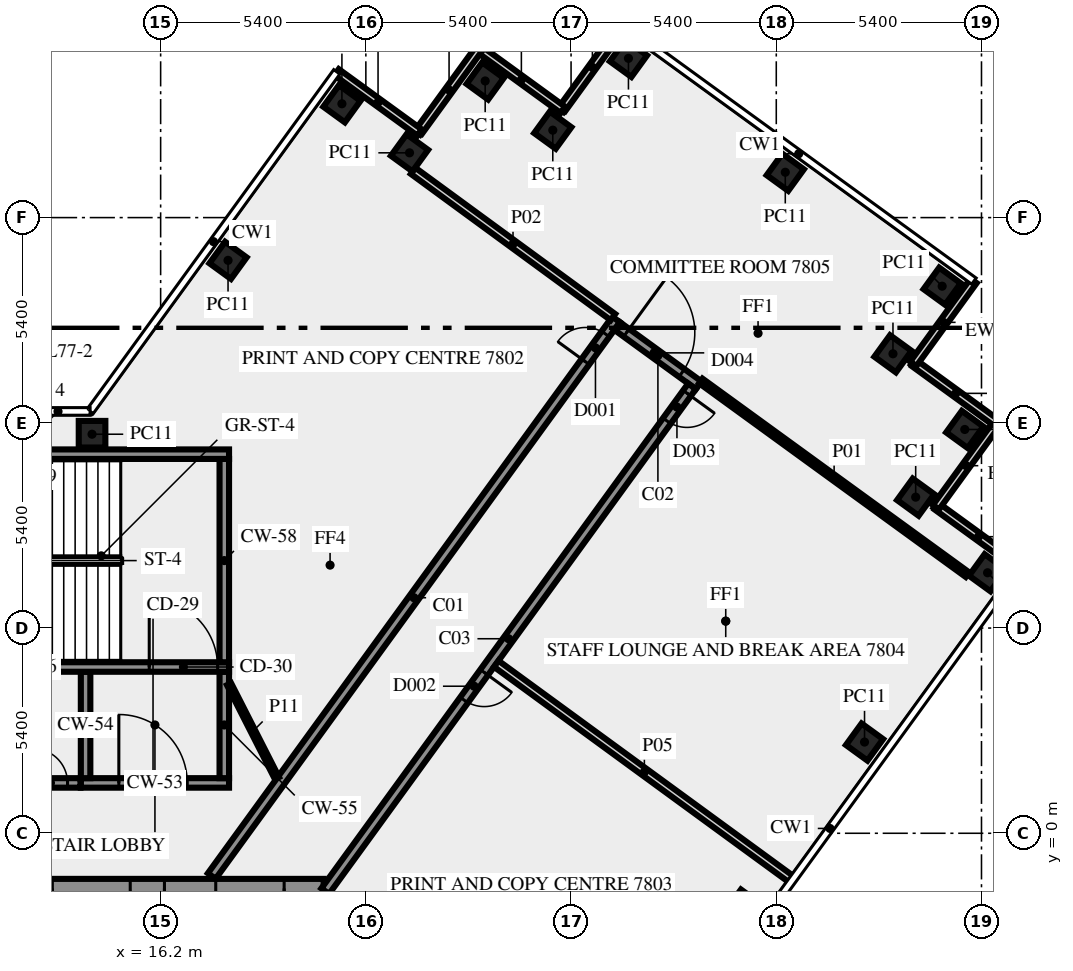
"""IFC4 building model, lengths in metres.
Left out: names, types, materials, properties, quantities, classifications, styles, units other than length and angle.
Written with IfcOpenShell. Run it as: python <this file> out.ifc"""

import sys

from ifc_helpers import new_model, si_unit, direction, frame, frame_2d, origin, origin_2d, place, context, subcontext, project, spatial, rectangle, extrude, element, fill, save


model = new_model("IFC4")
c1 = context("Model", 3, precision=1e-05, world=origin(), true_north=direction((0.0, 1.0)))
c2 = subcontext(c1, "Body", "Model", "MODEL_VIEW")
j1 = project(units=[si_unit("LENGTHUNIT", "METRE"), si_unit("PLANEANGLEUNIT", "RADIAN")], contexts=[c1])
p1 = place(None, origin())
s1 = spatial("IfcSite", under=j1, at=p1, CompositionType="ELEMENT")
p2 = place(p1, origin())
s2 = spatial("IfcBuilding", under=s1, at=p2, CompositionType="ELEMENT")
p3 = place(p2, frame((0.0, 0.0, 335.0)))
s3 = spatial("IfcBuildingStorey", under=s2, at=p3, CompositionType="ELEMENT", Elevation=335.0)
for number, where, z_axis, x_axis in (
    (1, (31.548, -1.969, 0.0), (0.0, 0.0, 1.0), (0.588, 0.809, 0.0)),
    (2, (34.722, 2.4, 0.0), (0.0, 0.0, 1.0), (0.588, 0.809, 0.0)),
    (3, (37.96, 6.855, 0.0), (0.0, 0.0, 1.0), (0.588, 0.809, 0.0)),
    (4, (36.068, 8.844, 0.0), (0.0, 0.0, 1.0), (0.588, 0.809, 0.0)),
    (5, (37.36, 10.625, 0.0), (0.0, 0.0, 1.0), (0.588, 0.809, 0.0)),
    (6, (35.471, 12.616, 0.0), (0.0, 0.0, 1.0), (-0.809, 0.588, 0.0)),
    (7, (36.765, 14.395, 0.0), (0.0, 0.0, 1.0), (-0.809, 0.588, 0.0)),
    (8, (32.637, 17.393, 0.0), (0.0, 0.0, 1.0), (-0.809, 0.588, 0.0)),
    (9, (28.51, 20.39, 0.0), (0.0, 0.0, 1.0), (-0.588, -0.809, 0.0)),
    (10, (26.519, 18.5, 0.0), (0.0, 0.0, 1.0), (-0.809, 0.588, 0.0)),
    (11, (24.74, 19.795, 0.0), (0.0, 0.0, 1.0), (-0.588, -0.809, 0.0)),
    (12, (22.749, 17.904, 0.0), (0.0, 0.0, 1.0), (-0.588, -0.809, 0.0)),
    (13, (20.97, 19.195, 0.0), (0.0, 0.0, 1.0), (-0.588, -0.809, 0.0)),
    (14, (17.974, 15.075, 0.0), (0.0, 0.0, 1.0), (-0.588, -0.809, 0.0)),
    (15, (14.395, 10.5, 0.0), (0.0, 0.0, 1.0), (-1.0, 0.0, 0.0)),
):
    element("IfcColumn", number, at=place(p3, frame(where, z_axis=z_axis, x_axis=x_axis)), inside=s3, PredefinedType="COLUMN", context=c2, shape_type="SweptSolid", body=[
        extrude(rectangle(XDim=0.7, YDim=0.7, at=origin_2d()), origin(), (0.0, 0.0, 1.0), 3.65),
    ])
for number, where, z_axis, x_axis in (
    (16, (38.814, 7.01, 0.0), (0.0, 0.0, 1.0), (-0.809, 0.588, 0.0)),
    (17, (36.602, 8.58, 0.0), (0.0, 0.0, 1.0), (0.588, 0.809, 0.0)),
    (18, (38.216, 10.782, 0.0), (0.0, 0.0, 1.0), (-0.809, 0.588, 0.0)),
    (19, (36.005, 12.352, 0.0), (0.0, 0.0, 1.0), (0.588, 0.809, 0.0)),
):
    element("IfcWall", number, at=place(p3, frame(where, z_axis=z_axis, x_axis=x_axis)), inside=s3, PredefinedType="SOLIDWALL", context=c2, shape_type="SweptSolid", body=[
        extrude(rectangle(XDim=2.7, YDim=0.2, at=frame_2d((1.35, 0.0))), origin(), (0.0, 0.0, 1.0), 3.65),
    ])
for number, where, z_axis, x_axis in (
    (20, (28.354, 21.247, 0.0), (0.0, 0.0, 1.0), (-0.588, -0.809, 0.0)),
    (21, (26.785, 19.036, 0.0), (0.0, 0.0, 1.0), (-0.809, 0.588, 0.0)),
):
    element("IfcWall", number, at=place(p3, frame(where, z_axis=z_axis, x_axis=x_axis)), inside=s3, PredefinedType="SOLIDWALL", context=c2, shape_type="SweptSolid", body=[
        extrude(rectangle(XDim=2.7, YDim=0.2, at=frame_2d((1.35, 0.0))), origin(), (0.0, 0.0, 1.0), 3.65),
    ])
for number, where, z_axis, x_axis in (
    (22, (24.583, 20.65, 0.0), (0.0, 0.0, 1.0), (-0.588, -0.809, 0.0)),
    (23, (23.013, 18.438, 0.0), (0.0, 0.0, 1.0), (-0.809, 0.588, 0.0)),
):
    element("IfcWall", number, at=place(p3, frame(where, z_axis=z_axis, x_axis=x_axis)), inside=s3, PredefinedType="SOLIDWALL", context=c2, shape_type="SweptSolid", body=[
        extrude(rectangle(XDim=2.7, YDim=0.2, at=frame_2d((1.35, 0.0))), origin(), (0.0, 0.0, 1.0), 3.65),
    ])
p4 = place(p3, frame((20.49, -1.45, 0.0), z_axis=(0.0, 0.0, 1.0), x_axis=(-1.0, 0.0, 0.0)))
e24 = element("IfcWall", 24, at=p4, inside=s3, PredefinedType="SHEAR", context=c2, shape_type="SweptSolid", body=[
    extrude(rectangle(XDim=40.98, YDim=0.5, at=frame_2d((20.49, 0.0))), origin(), (0.0, 0.0, 1.0), 3.65),
])
p5 = place(p4, frame((38.14, 0.0, 0.0)))
e25 = element("IfcOpeningElement", 25, at=p5, cuts=e24, PredefinedType="OPENING", context=c2, shape_type="SweptSolid", body=[
    extrude(rectangle(XDim=1.8, YDim=2.1, at=frame_2d((0.9, 1.05))), frame((0.0, 0.26, 0.0), z_axis=(0.0, -1.0, 0.0), x_axis=(1.0, 0.0, 0.0)), (0.0, 0.0, 1.0), 0.52),
])
p6 = place(p4, frame((36.728, 0.0, 0.0)))
e26 = element("IfcOpeningElement", 26, at=p6, cuts=e24, PredefinedType="OPENING", context=c2, shape_type="SweptSolid", body=[
    extrude(rectangle(XDim=0.8, YDim=2.1, at=frame_2d((0.4, 1.05))), frame((0.0, 0.26, 0.0), z_axis=(0.0, -1.0, 0.0), x_axis=(1.0, 0.0, 0.0)), (0.0, 0.0, 1.0), 0.52),
])
p7 = place(p4, frame((35.153, 0.0, 0.0)))
e27 = element("IfcOpeningElement", 27, at=p7, cuts=e24, PredefinedType="OPENING", context=c2, shape_type="SweptSolid", body=[
    extrude(rectangle(XDim=0.8, YDim=2.1, at=frame_2d((0.4, 1.05))), frame((0.0, 0.26, 0.0), z_axis=(0.0, -1.0, 0.0), x_axis=(1.0, 0.0, 0.0)), (0.0, 0.0, 1.0), 0.52),
])
p8 = place(p4, frame((32.94, 0.0, 0.0)))
e28 = element("IfcOpeningElement", 28, at=p8, cuts=e24, PredefinedType="OPENING", context=c2, shape_type="SweptSolid", body=[
    extrude(rectangle(XDim=0.9, YDim=2.1, at=frame_2d((0.45, 1.05))), frame((0.0, 0.26, 0.0), z_axis=(0.0, -1.0, 0.0), x_axis=(1.0, 0.0, 0.0)), (0.0, 0.0, 1.0), 0.52),
])
p9 = place(p4, frame((31.015, 0.0, 0.0)))
e29 = element("IfcOpeningElement", 29, at=p9, cuts=e24, PredefinedType="OPENING", context=c2, shape_type="SweptSolid", body=[
    extrude(rectangle(XDim=0.8, YDim=2.1, at=frame_2d((0.4, 1.05))), frame((0.0, 0.26, 0.0), z_axis=(0.0, -1.0, 0.0), x_axis=(1.0, 0.0, 0.0)), (0.0, 0.0, 1.0), 0.52),
])
p10 = place(p4, frame((24.765, 0.0, 0.0)))
e30 = element("IfcOpeningElement", 30, at=p10, cuts=e24, PredefinedType="OPENING", context=c2, shape_type="SweptSolid", body=[
    extrude(rectangle(XDim=0.8, YDim=2.1, at=frame_2d((0.4, 1.05))), frame((0.0, 0.26, 0.0), z_axis=(0.0, -1.0, 0.0), x_axis=(1.0, 0.0, 0.0)), (0.0, 0.0, 1.0), 0.52),
])
p11 = place(p4, frame((19.59, 0.0, 0.0)))
e31 = element("IfcOpeningElement", 31, at=p11, cuts=e24, PredefinedType="OPENING", context=c2, shape_type="SweptSolid", body=[
    extrude(rectangle(XDim=2.0, YDim=2.1, at=frame_2d((1.0, 1.05))), frame((0.0, 0.26, 0.0), z_axis=(0.0, -1.0, 0.0), x_axis=(1.0, 0.0, 0.0)), (0.0, 0.0, 1.0), 0.52),
])
p12 = place(p4, frame((15.103, 0.0, 0.0)))
e32 = element("IfcOpeningElement", 32, at=p12, cuts=e24, PredefinedType="OPENING", context=c2, shape_type="SweptSolid", body=[
    extrude(rectangle(XDim=0.9, YDim=2.1, at=frame_2d((0.45, 1.05))), frame((0.0, 0.26, 0.0), z_axis=(0.0, -1.0, 0.0), x_axis=(1.0, 0.0, 0.0)), (0.0, 0.0, 1.0), 0.52),
])
p13 = place(p4, frame((13.04, 0.0, 0.0)))
e33 = element("IfcOpeningElement", 33, at=p13, cuts=e24, PredefinedType="OPENING", context=c2, shape_type="SweptSolid", body=[
    extrude(rectangle(XDim=0.9, YDim=2.1, at=frame_2d((0.45, 1.05))), frame((0.0, 0.26, 0.0), z_axis=(0.0, -1.0, 0.0), x_axis=(1.0, 0.0, 0.0)), (0.0, 0.0, 1.0), 0.52),
])
p14 = place(p4, frame((10.177, 0.0, 0.0)))
e34 = element("IfcOpeningElement", 34, at=p14, cuts=e24, PredefinedType="OPENING", context=c2, shape_type="SweptSolid", body=[
    extrude(rectangle(XDim=0.9, YDim=2.1, at=frame_2d((0.45, 1.05))), frame((0.0, 0.26, 0.0), z_axis=(0.0, -1.0, 0.0), x_axis=(1.0, 0.0, 0.0)), (0.0, 0.0, 1.0), 0.52),
])
p15 = place(p4, frame((7.14, 0.0, 0.0)))
e35 = element("IfcOpeningElement", 35, at=p15, cuts=e24, PredefinedType="OPENING", context=c2, shape_type="SweptSolid", body=[
    extrude(rectangle(XDim=0.9, YDim=2.1, at=frame_2d((0.45, 1.05))), frame((0.0, 0.26, 0.0), z_axis=(0.0, -1.0, 0.0), x_axis=(1.0, 0.0, 0.0)), (0.0, 0.0, 1.0), 0.52),
])
p16 = place(p4, frame((4.19, 0.0, 0.0)))
e36 = element("IfcOpeningElement", 36, at=p16, cuts=e24, PredefinedType="OPENING", context=c2, shape_type="SweptSolid", body=[
    extrude(rectangle(XDim=0.9, YDim=2.1, at=frame_2d((0.45, 1.05))), frame((0.0, 0.26, 0.0), z_axis=(0.0, -1.0, 0.0), x_axis=(1.0, 0.0, 0.0)), (0.0, 0.0, 1.0), 0.52),
])
p17 = place(p4, frame((1.04, 0.0, 0.0)))
e37 = element("IfcOpeningElement", 37, at=p17, cuts=e24, PredefinedType="OPENING", context=c2, shape_type="SweptSolid", body=[
    extrude(rectangle(XDim=1.8, YDim=2.1, at=frame_2d((0.9, 1.05))), frame((0.0, 0.26, 0.0), z_axis=(0.0, -1.0, 0.0), x_axis=(1.0, 0.0, 0.0)), (0.0, 0.0, 1.0), 0.52),
])
p18 = place(p3, frame((14.1, 1.325, 0.0), z_axis=(0.0, 0.0, 1.0), x_axis=(1.0, 0.0, 0.0)))
e38 = element("IfcWall", 38, at=p18, inside=s3, PredefinedType="SHEAR", context=c2, shape_type="SweptSolid", body=[
    extrude(rectangle(XDim=3.9, YDim=0.25, at=frame_2d((1.95, 0.0))), origin(), (0.0, 0.0, 1.0), 3.65),
])
p19 = place(p18, frame((1.0, 0.0, 0.0)))
e39 = element("IfcOpeningElement", 39, at=p19, cuts=e38, PredefinedType="OPENING", context=c2, shape_type="SweptSolid", body=[
    extrude(rectangle(XDim=1.8, YDim=2.1, at=frame_2d((0.9, 1.05))), frame((0.0, 0.135, 0.0), z_axis=(0.0, -1.0, 0.0), x_axis=(1.0, 0.0, 0.0)), (0.0, 0.0, 1.0), 0.27),
])
for number, where, z_axis, x_axis in (
    (40, (14.225, 1.45, 0.0), (0.0, 0.0, 1.0), (0.0, 1.0, 0.0)),
    (41, (17.875, 1.45, 0.0), (0.0, 0.0, 1.0), (0.0, 1.0, 0.0)),
):
    element("IfcWall", number, at=place(p3, frame(where, z_axis=z_axis, x_axis=x_axis)), inside=s3, PredefinedType="SHEAR", context=c2, shape_type="SweptSolid", body=[
        extrude(rectangle(XDim=2.8, YDim=0.25, at=frame_2d((1.4, 0.0))), origin(), (0.0, 0.0, 1.0), 3.65),
    ])
p20 = place(p3, frame((7.5, 4.375, 0.0), z_axis=(0.0, 0.0, 1.0), x_axis=(1.0, 0.0, 0.0)))
e42 = element("IfcWall", 42, at=p20, inside=s3, PredefinedType="SHEAR", context=c2, shape_type="SweptSolid", body=[
    extrude(rectangle(XDim=10.5, YDim=0.25, at=frame_2d((5.25, 0.0))), origin(), (0.0, 0.0, 1.0), 3.65),
])
p21 = place(p20, frame((8.4, 0.0, 0.0)))
e43 = element("IfcOpeningElement", 43, at=p21, cuts=e42, PredefinedType="OPENING", context=c2, shape_type="SweptSolid", body=[
    extrude(rectangle(XDim=1.8, YDim=2.1, at=frame_2d((0.9, 1.05))), frame((0.0, 0.135, 0.0), z_axis=(0.0, -1.0, 0.0), x_axis=(1.0, 0.0, 0.0)), (0.0, 0.0, 1.0), 0.27),
])
p22 = place(p3, frame((17.875, 4.5, 0.0), z_axis=(0.0, 0.0, 1.0), x_axis=(0.0, 1.0, 0.0)))
e44 = element("IfcWall", 44, at=p22, inside=s3, PredefinedType="SHEAR", context=c2, shape_type="SweptSolid", body=[
    extrude(rectangle(XDim=5.35, YDim=0.25, at=frame_2d((2.675, 0.0))), origin(), (0.0, 0.0, 1.0), 3.65),
])
p23 = place(p3, frame((7.5, 9.975, 0.0), z_axis=(0.0, 0.0, 1.0), x_axis=(1.0, 0.0, 0.0)))
e45 = element("IfcWall", 45, at=p23, inside=s3, PredefinedType="SHEAR", context=c2, shape_type="SweptSolid", body=[
    extrude(rectangle(XDim=10.5, YDim=0.25, at=frame_2d((5.25, 0.0))), origin(), (0.0, 0.0, 1.0), 3.65),
])
p24 = place(p23, frame((2.0, 0.0, 1.0)))
e46 = element("IfcOpeningElement", 46, at=p24, cuts=e45, PredefinedType="OPENING", context=c2, shape_type="SweptSolid", body=[
    extrude(rectangle(XDim=1.2, YDim=1.2, at=frame_2d((0.6, 0.6))), frame((0.0, 0.135, 0.0), z_axis=(0.0, -1.0, 0.0), x_axis=(1.0, 0.0, 0.0)), (0.0, 0.0, 1.0), 0.27),
])
p25 = place(p3, frame((17.545, -1.125, 0.0), z_axis=(0.0, 0.0, 1.0), x_axis=(0.58779555165, 0.809009511354, 0.0)))
e47 = element("IfcWall", 47, at=p25, inside=s3, PredefinedType="SOLIDWALL", context=c2, shape_type="SweptSolid", body=[
    extrude(rectangle(XDim=18.103, YDim=0.25, at=frame_2d((9.052, 0.0))), origin(), (0.0, 0.0, 1.0), 3.65),
])
p26 = place(p25, frame((16.728, 0.0, 0.0)))
e48 = element("IfcOpeningElement", 48, at=p26, cuts=e47, PredefinedType="OPENING", context=c2, shape_type="SweptSolid", body=[
    extrude(rectangle(XDim=0.9, YDim=2.1, at=frame_2d((0.45, 1.05))), frame((0.0, 0.135, 0.0), z_axis=(0.0, -1.0, 0.0), x_axis=(1.0, 0.0, 0.0)), (0.0, 0.0, 1.0), 0.27),
])
p27 = place(p3, frame((28.213, 13.346, 0.0), z_axis=(0.0, 0.0, 1.0), x_axis=(0.809006914995, -0.587799125119, 0.0)))
e49 = element("IfcWall", 49, at=p27, inside=s3, PredefinedType="SOLIDWALL", context=c2, shape_type="SweptSolid", body=[
    extrude(rectangle(XDim=2.65, YDim=0.25, at=frame_2d((1.325, 0.0))), origin(), (0.0, 0.0, 1.0), 3.65),
])
p28 = place(p27, frame((0.3, 0.0, 0.0)))
e50 = element("IfcOpeningElement", 50, at=p28, cuts=e49, PredefinedType="OPENING", context=c2, shape_type="SweptSolid", body=[
    extrude(rectangle(XDim=1.8, YDim=2.1, at=frame_2d((0.9, 1.05))), frame((0.0, 0.135, 0.0), z_axis=(0.0, -1.0, 0.0), x_axis=(1.0, 0.0, 0.0)), (0.0, 0.0, 1.0), 0.27),
])
p29 = place(p3, frame((30.183, 11.761, 0.0), z_axis=(0.0, 0.0, 1.0), x_axis=(-0.587781762867, -0.80901952958, 0.0)))
e51 = element("IfcWall", 51, at=p29, inside=s3, PredefinedType="SOLIDWALL", context=c2, shape_type="SweptSolid", body=[
    extrude(rectangle(XDim=16.42, YDim=0.25, at=frame_2d((8.21, 0.0))), origin(), (0.0, 0.0, 1.0), 3.65),
])
p30 = place(p29, frame((0.225, 0.0, 0.0)))
e52 = element("IfcOpeningElement", 52, at=p30, cuts=e51, PredefinedType="OPENING", context=c2, shape_type="SweptSolid", body=[
    extrude(rectangle(XDim=0.9, YDim=2.1, at=frame_2d((0.45, 1.05))), frame((0.0, 0.135, 0.0), z_axis=(0.0, -1.0, 0.0), x_axis=(1.0, 0.0, 0.0)), (0.0, 0.0, 1.0), 0.27),
])
p31 = place(p29, frame((9.304, 0.0, 0.0)))
e53 = element("IfcOpeningElement", 53, at=p31, cuts=e51, PredefinedType="OPENING", context=c2, shape_type="SweptSolid", body=[
    extrude(rectangle(XDim=0.9, YDim=2.1, at=frame_2d((0.45, 1.05))), frame((0.0, 0.135, 0.0), z_axis=(0.0, -1.0, 0.0), x_axis=(1.0, 0.0, 0.0)), (0.0, 0.0, 1.0), 0.27),
])
p32 = place(p3, frame((-5.246, 1.325, 0.0), z_axis=(0.0, 0.0, 1.0), x_axis=(1.0, 0.0, 0.0)))
e54 = element("IfcWall", 54, at=p32, inside=s3, PredefinedType="SOLIDWALL", context=c2, shape_type="SweptSolid", body=[
    extrude(rectangle(XDim=19.336, YDim=0.25, at=frame_2d((9.668, 0.0))), origin(), (0.0, 0.0, 1.0), 3.65),
])
p33 = place(p32, frame((1.277, 0.0, 0.0)))
e55 = element("IfcOpeningElement", 55, at=p33, cuts=e54, PredefinedType="OPENING", context=c2, shape_type="SweptSolid", body=[
    extrude(rectangle(XDim=0.9, YDim=2.1, at=frame_2d((0.45, 1.05))), frame((0.0, 0.135, 0.0), z_axis=(0.0, -1.0, 0.0), x_axis=(1.0, 0.0, 0.0)), (0.0, 0.0, 1.0), 0.27),
])
p34 = place(p32, frame((7.036, 0.0, 0.0)))
e56 = element("IfcOpeningElement", 56, at=p34, cuts=e54, PredefinedType="OPENING", context=c2, shape_type="SweptSolid", body=[
    extrude(rectangle(XDim=0.9, YDim=2.1, at=frame_2d((0.45, 1.05))), frame((0.0, 0.135, 0.0), z_axis=(0.0, -1.0, 0.0), x_axis=(1.0, 0.0, 0.0)), (0.0, 0.0, 1.0), 0.27),
])
p35 = place(p32, frame((18.096, 0.0, 0.0)))
e57 = element("IfcOpeningElement", 57, at=p35, cuts=e54, PredefinedType="OPENING", context=c2, shape_type="SweptSolid", body=[
    extrude(rectangle(XDim=0.9, YDim=2.1, at=frame_2d((0.45, 1.05))), frame((0.0, 0.135, 0.0), z_axis=(0.0, -1.0, 0.0), x_axis=(1.0, 0.0, 0.0)), (0.0, 0.0, 1.0), 0.27),
])
p36 = place(p3, frame((30.415, 11.902, 0.0), z_axis=(0.0, 0.0, 1.0), x_axis=(0.809020922653, -0.587779845444, 0.0)))
e58 = element("IfcWall", 58, at=p36, inside=s3, PredefinedType="PARTITIONING", context=c2, shape_type="SweptSolid", body=[
    extrude(rectangle(XDim=8.67, YDim=0.15, at=frame_2d((4.335, 0.0))), origin(), (0.0, 0.0, 1.0), 3.65),
])
p37 = place(p3, frame((22.844, 17.43, 0.0), z_axis=(0.0, 0.0, 1.0), x_axis=(0.80699548015, -0.590557613631, 0.0)))
e59 = element("IfcWall", 59, at=p37, inside=s3, PredefinedType="SOLIDWALL", context=c2, shape_type="SweptSolid", body=[
    extrude(rectangle(XDim=6.515, YDim=0.2, at=frame_2d((3.258, 0.0))), origin(), (0.0, 0.0, 1.0), 3.65),
])
p38 = place(p3, frame((25.032, 4.459, 0.0), z_axis=(0.0, 0.0, 1.0), x_axis=(0.807602415854, -0.589727342004, 0.0)))
e60 = element("IfcWall", 60, at=p38, inside=s3, PredefinedType="SOLIDWALL", context=c2, shape_type="SweptSolid", body=[
    extrude(rectangle(XDim=9.651, YDim=0.2, at=frame_2d((4.826, 0.0))), origin(), (0.0, 0.0, 1.0), 2.95),
])
p39 = place(p3, frame((18.0, 3.925, 0.0), z_axis=(0.0, 0.0, 1.0), x_axis=(0.453950796792, -0.891026752736, 0.0)))
e61 = element("IfcWall", 61, at=p39, inside=s3, PredefinedType="PARTITIONING", context=c2, shape_type="SweptSolid", body=[
    extrude(rectangle(XDim=2.778, YDim=0.12, at=frame_2d((1.389, 0.0))), origin(), (0.0, 0.0, 1.0), 3.65),
])
p40 = place(p16, origin())
e62 = element("IfcDoor", 62, at=p40, inside=s3, OperationType="SINGLE_SWING_LEFT", PredefinedType="DOOR", context=c2, shape_type="SweptSolid", body=[
    extrude(rectangle(XDim=0.9, YDim=2.1, at=frame_2d((0.45, 1.05))), frame((0.0, 0.025, 0.0), z_axis=(0.0, -1.0, 0.0), x_axis=(1.0, 0.0, 0.0)), (0.0, 0.0, 1.0), 0.05),
])
fill(e36, e62)
p41 = place(p17, origin())
e63 = element("IfcDoor", 63, at=p41, inside=s3, OperationType="DOUBLE_DOOR_SINGLE_SWING", PredefinedType="DOOR", context=c2, shape_type="SweptSolid", body=[
    extrude(rectangle(XDim=1.8, YDim=2.1, at=frame_2d((0.9, 1.05))), frame((0.0, 0.025, 0.0), z_axis=(0.0, -1.0, 0.0), x_axis=(1.0, 0.0, 0.0)), (0.0, 0.0, 1.0), 0.05),
])
fill(e37, e63)
p42 = place(p19, origin())
e64 = element("IfcDoor", 64, at=p42, inside=s3, OperationType="DOUBLE_DOOR_SINGLE_SWING", PredefinedType="DOOR", context=c2, shape_type="SweptSolid", body=[
    extrude(rectangle(XDim=1.8, YDim=2.1, at=frame_2d((0.9, 1.05))), frame((0.0, 0.025, 0.0), z_axis=(0.0, -1.0, 0.0), x_axis=(1.0, 0.0, 0.0)), (0.0, 0.0, 1.0), 0.05),
])
fill(e39, e64)
p43 = place(p21, origin())
e65 = element("IfcDoor", 65, at=p43, inside=s3, OperationType="DOUBLE_DOOR_SINGLE_SWING", PredefinedType="DOOR", context=c2, shape_type="SweptSolid", body=[
    extrude(rectangle(XDim=1.8, YDim=2.1, at=frame_2d((0.9, 1.05))), frame((0.0, 0.025, 0.0), z_axis=(0.0, -1.0, 0.0), x_axis=(1.0, 0.0, 0.0)), (0.0, 0.0, 1.0), 0.05),
])
fill(e43, e65)
p44 = place(p28, origin())
e66 = element("IfcDoor", 66, at=p44, inside=s3, OperationType="DOUBLE_DOOR_SINGLE_SWING", PredefinedType="DOOR", context=c2, shape_type="SweptSolid", body=[
    extrude(rectangle(XDim=1.8, YDim=2.1, at=frame_2d((0.9, 1.05))), frame((0.0, 0.025, 0.0), z_axis=(0.0, -1.0, 0.0), x_axis=(1.0, 0.0, 0.0)), (0.0, 0.0, 1.0), 0.05),
])
fill(e50, e66)
p45 = place(p30, origin())
e67 = element("IfcDoor", 67, at=p45, inside=s3, OperationType="SINGLE_SWING_LEFT", PredefinedType="DOOR", context=c2, shape_type="SweptSolid", body=[
    extrude(rectangle(XDim=0.9, YDim=2.1, at=frame_2d((0.45, 1.05))), frame((0.0, 0.025, 0.0), z_axis=(0.0, -1.0, 0.0), x_axis=(1.0, 0.0, 0.0)), (0.0, 0.0, 1.0), 0.05),
])
fill(e52, e67)
p46 = place(p26, origin())
e68 = element("IfcDoor", 68, at=p46, inside=s3, OperationType="SINGLE_SWING_RIGHT", PredefinedType="DOOR", context=c2, shape_type="SweptSolid", body=[
    extrude(rectangle(XDim=0.9, YDim=2.1, at=frame_2d((0.45, 1.05))), frame((0.0, 0.025, 0.0), z_axis=(0.0, -1.0, 0.0), x_axis=(1.0, 0.0, 0.0)), (0.0, 0.0, 1.0), 0.05),
])
fill(e48, e68)
p47 = place(p31, origin())
e69 = element("IfcDoor", 69, at=p47, inside=s3, OperationType="SINGLE_SWING_LEFT", PredefinedType="DOOR", context=c2, shape_type="SweptSolid", body=[
    extrude(rectangle(XDim=0.9, YDim=2.1, at=frame_2d((0.45, 1.05))), frame((0.0, 0.025, 0.0), z_axis=(0.0, -1.0, 0.0), x_axis=(1.0, 0.0, 0.0)), (0.0, 0.0, 1.0), 0.05),
])
fill(e53, e69)
p48 = place(p35, origin())
e70 = element("IfcDoor", 70, at=p48, inside=s3, OperationType="SINGLE_SWING_RIGHT", PredefinedType="DOOR", context=c2, shape_type="SweptSolid", body=[
    extrude(rectangle(XDim=0.9, YDim=2.1, at=frame_2d((0.45, 1.05))), frame((0.0, 0.025, 0.0), z_axis=(0.0, -1.0, 0.0), x_axis=(1.0, 0.0, 0.0)), (0.0, 0.0, 1.0), 0.05),
])
fill(e57, e70)
save(model, sys.argv[1])
